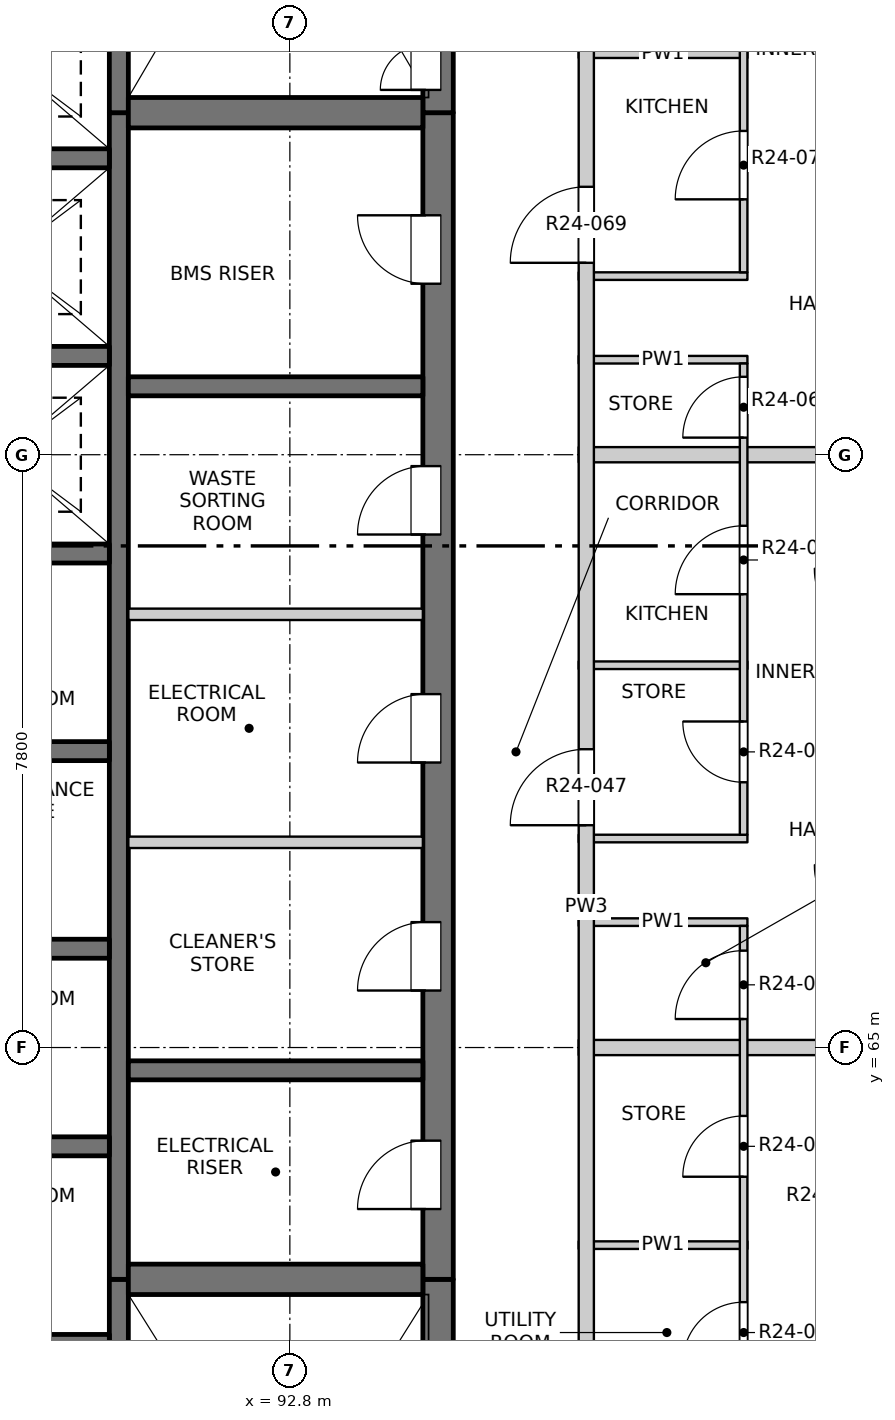
"""IFC4 building model, lengths in metres.
Left out: names, types, materials, properties, quantities, classifications, styles, units other than length and angle.
Written with IfcOpenShell. Run it as: python <this file> out.ifc"""

import sys

from ifc_helpers import new_model, si_unit, direction, frame, frame_2d, origin, place, context, subcontext, project, spatial, rectangle, extrude, element, fill, save


model = new_model("IFC4")
c1 = context("Model", 3, precision=1e-05, world=origin(), true_north=direction((0.0, 1.0)))
c2 = subcontext(c1, "Body", "Model", "MODEL_VIEW")
j1 = project(units=[si_unit("LENGTHUNIT", "METRE"), si_unit("PLANEANGLEUNIT", "RADIAN")], contexts=[c1])
p1 = place(None, origin())
s1 = spatial("IfcSite", under=j1, at=p1, CompositionType="ELEMENT")
p2 = place(p1, origin())
s2 = spatial("IfcBuilding", under=s1, at=p2, CompositionType="ELEMENT")
p3 = place(p2, frame((0.0, 0.0, 246.0)))
s3 = spatial("IfcBuildingStorey", under=s2, at=p3, CompositionType="ELEMENT", Elevation=246.0)
p4 = place(p3, frame((94.75, 55.05, -0.3), z_axis=(0.0, 0.0, 1.0), x_axis=(0.0, 1.0, 0.0)))
e1 = element("IfcWall", 1, at=p4, inside=s3, PredefinedType="SOLIDWALL", context=c2, shape_type="SweptSolid", body=[
    extrude(rectangle(XDim=6.9, YDim=0.4, at=frame_2d((3.45, 0.0))), origin(), (0.0, 0.0, 1.0), 3.45),
])
p5 = place(p4, frame((0.6, 0.0, 0.3)))
e2 = element("IfcOpeningElement", 2, at=p5, cuts=e1, PredefinedType="OPENING", context=c2, shape_type="SweptSolid", body=[
    extrude(rectangle(XDim=1.2, YDim=2.1, at=frame_2d((0.6, 1.05))), frame((0.0, 0.21, 0.0), z_axis=(0.0, -1.0, 0.0), x_axis=(1.0, 0.0, 0.0)), (0.0, 0.0, 1.0), 0.42),
])
p6 = place(p3, frame((94.75, 61.95, -0.3), z_axis=(0.0, 0.0, 1.0), x_axis=(0.0, 1.0, 0.0)))
e3 = element("IfcWall", 3, at=p6, inside=s3, PredefinedType="SOLIDWALL", context=c2, shape_type="SweptSolid", body=[
    extrude(rectangle(XDim=15.35, YDim=0.4, at=frame_2d((7.675, 0.0))), origin(), (0.0, 0.0, 1.0), 3.45),
])
p7 = place(p6, frame((0.925, 0.0, 0.3)))
e4 = element("IfcOpeningElement", 4, at=p7, cuts=e3, PredefinedType="OPENING", context=c2, shape_type="SweptSolid", body=[
    extrude(rectangle(XDim=0.9, YDim=2.1, at=frame_2d((0.45, 1.05))), frame((0.0, 0.21, 0.0), z_axis=(0.0, -1.0, 0.0), x_axis=(1.0, 0.0, 0.0)), (0.0, 0.0, 1.0), 0.42),
])
p8 = place(p6, frame((3.8, 0.0, 0.3)))
e5 = element("IfcOpeningElement", 5, at=p8, cuts=e3, PredefinedType="OPENING", context=c2, shape_type="SweptSolid", body=[
    extrude(rectangle(XDim=0.9, YDim=2.1, at=frame_2d((0.45, 1.05))), frame((0.0, 0.21, 0.0), z_axis=(0.0, -1.0, 0.0), x_axis=(1.0, 0.0, 0.0)), (0.0, 0.0, 1.0), 0.42),
])
p9 = place(p6, frame((6.8, 0.0, 0.3)))
e6 = element("IfcOpeningElement", 6, at=p9, cuts=e3, PredefinedType="OPENING", context=c2, shape_type="SweptSolid", body=[
    extrude(rectangle(XDim=0.9, YDim=2.1, at=frame_2d((0.45, 1.05))), frame((0.0, 0.21, 0.0), z_axis=(0.0, -1.0, 0.0), x_axis=(1.0, 0.0, 0.0)), (0.0, 0.0, 1.0), 0.42),
])
p10 = place(p6, frame((9.8, 0.0, 0.3)))
e7 = element("IfcOpeningElement", 7, at=p10, cuts=e3, PredefinedType="OPENING", context=c2, shape_type="SweptSolid", body=[
    extrude(rectangle(XDim=0.9, YDim=2.1, at=frame_2d((0.45, 1.05))), frame((0.0, 0.21, 0.0), z_axis=(0.0, -1.0, 0.0), x_axis=(1.0, 0.0, 0.0)), (0.0, 0.0, 1.0), 0.42),
])
p11 = place(p6, frame((13.1, 0.0, 0.3)))
e8 = element("IfcOpeningElement", 8, at=p11, cuts=e3, PredefinedType="OPENING", context=c2, shape_type="SweptSolid", body=[
    extrude(rectangle(XDim=0.9, YDim=2.1, at=frame_2d((0.45, 1.05))), frame((0.0, 0.21, 0.0), z_axis=(0.0, -1.0, 0.0), x_axis=(1.0, 0.0, 0.0)), (0.0, 0.0, 1.0), 0.42),
])
p12 = place(p3, frame((94.75, 77.3, -0.3), z_axis=(0.0, 0.0, 1.0), x_axis=(0.0, 1.0, 0.0)))
e9 = element("IfcWall", 9, at=p12, inside=s3, PredefinedType="SOLIDWALL", context=c2, shape_type="SweptSolid", body=[
    extrude(rectangle(XDim=7.4, YDim=0.4, at=frame_2d((3.7, 0.0))), origin(), (0.0, 0.0, 1.0), 3.45),
])
p13 = place(p12, frame((0.3, 0.0, 0.3)))
e10 = element("IfcOpeningElement", 10, at=p13, cuts=e9, PredefinedType="OPENING", context=c2, shape_type="SweptSolid", body=[
    extrude(rectangle(XDim=1.2, YDim=2.1, at=frame_2d((0.6, 1.05))), frame((0.0, 0.21, 0.0), z_axis=(0.0, -1.0, 0.0), x_axis=(1.0, 0.0, 0.0)), (0.0, 0.0, 1.0), 0.42),
])
p14 = place(p3, frame((90.55, 55.45, -0.3), z_axis=(0.0, 0.0, 1.0), x_axis=(0.0, 1.0, 0.0)))
e11 = element("IfcWall", 11, at=p14, inside=s3, PredefinedType="SOLIDWALL", context=c2, shape_type="SweptSolid", body=[
    extrude(rectangle(XDim=6.5, YDim=0.25, at=frame_2d((3.25, 0.0))), origin(), (0.0, 0.0, 1.0), 3.45),
])
p15 = place(p3, frame((90.55, 61.95, -0.3), z_axis=(0.0, 0.0, 1.0), x_axis=(0.0, 1.0, 0.0)))
e12 = element("IfcWall", 12, at=p15, inside=s3, PredefinedType="SOLIDWALL", context=c2, shape_type="SweptSolid", body=[
    extrude(rectangle(XDim=15.35, YDim=0.25, at=frame_2d((7.675, 0.0))), origin(), (0.0, 0.0, 1.0), 3.45),
])
p16 = place(p3, frame((90.55, 77.3, -0.3), z_axis=(0.0, 0.0, 1.0), x_axis=(0.0, 1.0, 0.0)))
e13 = element("IfcWall", 13, at=p16, inside=s3, PredefinedType="SOLIDWALL", context=c2, shape_type="SweptSolid", body=[
    extrude(rectangle(XDim=7.0, YDim=0.25, at=frame_2d((3.5, 0.0))), origin(), (0.0, 0.0, 1.0), 3.45),
])
for number, where, z_axis, x_axis in (
    (14, (87.425, 61.1, -0.3), (0.0, 0.0, 1.0), (1.0, 0.0, 0.0)),
    (15, (87.425, 63.7, -0.3), (0.0, 0.0, 1.0), (1.0, 0.0, 0.0)),
    (16, (87.425, 66.3, -0.3), (0.0, 0.0, 1.0), (1.0, 0.0, 0.0)),
    (17, (87.425, 68.9, -0.3), (0.0, 0.0, 1.0), (1.0, 0.0, 0.0)),
    (18, (87.425, 71.5, -0.3), (0.0, 0.0, 1.0), (1.0, 0.0, 0.0)),
    (19, (87.425, 74.1, -0.3), (0.0, 0.0, 1.0), (1.0, 0.0, 0.0)),
    (20, (87.425, 76.7, -0.3), (0.0, 0.0, 1.0), (1.0, 0.0, 0.0)),
):
    element("IfcWall", number, at=place(p3, frame(where, z_axis=z_axis, x_axis=x_axis)), inside=s3, PredefinedType="SOLIDWALL", context=c2, shape_type="SweptSolid", body=[
        extrude(rectangle(XDim=3.0, YDim=0.25, at=frame_2d((1.5, 0.0))), origin(), (0.0, 0.0, 1.0), 3.45),
    ])
p17 = place(p3, frame((90.675, 61.95, -0.3), z_axis=(0.0, 0.0, 1.0), x_axis=(1.0, 0.0, 0.0)))
e21 = element("IfcWall", 21, at=p17, inside=s3, PredefinedType="SOLIDWALL", context=c2, shape_type="SweptSolid", body=[
    extrude(rectangle(XDim=3.875, YDim=0.4, at=frame_2d((1.938, 0.0))), origin(), (0.0, 0.0, 1.0), 3.45),
])
for number, where, z_axis, x_axis in (
    (22, (90.675, 64.7, -0.3), (0.0, 0.0, 1.0), (1.0, 0.0, 0.0)),
    (23, (90.675, 73.7, -0.3), (0.0, 0.0, 1.0), (1.0, 0.0, 0.0)),
):
    element("IfcWall", number, at=place(p3, frame(where, z_axis=z_axis, x_axis=x_axis)), inside=s3, PredefinedType="SOLIDWALL", context=c2, shape_type="SweptSolid", body=[
        extrude(rectangle(XDim=3.875, YDim=0.25, at=frame_2d((1.938, 0.0))), origin(), (0.0, 0.0, 1.0), 3.45),
    ])
p18 = place(p3, frame((90.675, 77.3, -0.3), z_axis=(0.0, 0.0, 1.0), x_axis=(1.0, 0.0, 0.0)))
e24 = element("IfcWall", 24, at=p18, inside=s3, PredefinedType="SOLIDWALL", context=c2, shape_type="SweptSolid", body=[
    extrude(rectangle(XDim=3.875, YDim=0.4, at=frame_2d((1.938, 0.0))), origin(), (0.0, 0.0, 1.0), 3.45),
])
p19 = place(p3, frame((96.6, 62.4, 0.0), z_axis=(0.0, 0.0, 1.0), x_axis=(1.0, 0.0, 0.0)))
e25 = element("IfcWall", 25, at=p19, inside=s3, PredefinedType="PARTITIONING", context=c2, shape_type="SweptSolid", body=[
    extrude(rectangle(XDim=2.22, YDim=0.1, at=frame_2d((1.11, 0.0))), origin(), (0.0, 0.0, 1.0), 3.15),
])
p20 = place(p3, frame((96.6, 65.0, 0.0), z_axis=(0.0, 0.0, 1.0), x_axis=(1.0, 0.0, 0.0)))
e26 = element("IfcWall", 26, at=p20, inside=s3, PredefinedType="PARTITIONING", context=c2, shape_type="SweptSolid", body=[
    extrude(rectangle(XDim=7.6, YDim=0.2, at=frame_2d((3.8, 0.0))), origin(), (0.0, 0.0, 1.0), 3.15),
])
p21 = place(p3, frame((96.6, 66.65, 0.0), z_axis=(0.0, 0.0, 1.0), x_axis=(1.0, 0.0, 0.0)))
e27 = element("IfcWall", 27, at=p21, inside=s3, PredefinedType="PARTITIONING", context=c2, shape_type="SweptSolid", body=[
    extrude(rectangle(XDim=2.22, YDim=0.1, at=frame_2d((1.11, 0.0))), origin(), (0.0, 0.0, 1.0), 3.15),
])
p22 = place(p3, frame((90.675, 67.7, 0.0), z_axis=(0.0, 0.0, 1.0), x_axis=(1.0, 0.0, 0.0)))
e28 = element("IfcWall", 28, at=p22, inside=s3, PredefinedType="PARTITIONING", context=c2, shape_type="SweptSolid", body=[
    extrude(rectangle(XDim=3.875, YDim=0.15, at=frame_2d((1.938, 0.0))), origin(), (0.0, 0.0, 1.0), 3.15),
])
for number, where, z_axis, x_axis in (
    (29, (96.6, 67.75, 0.0), (0.0, 0.0, 1.0), (1.0, 0.0, 0.0)),
    (30, (96.6, 70.03, 0.0), (0.0, 0.0, 1.0), (1.0, 0.0, 0.0)),
):
    element("IfcWall", number, at=place(p3, frame(where, z_axis=z_axis, x_axis=x_axis)), inside=s3, PredefinedType="PARTITIONING", context=c2, shape_type="SweptSolid", body=[
        extrude(rectangle(XDim=2.22, YDim=0.1, at=frame_2d((1.11, 0.0))), origin(), (0.0, 0.0, 1.0), 3.15),
    ])
p23 = place(p3, frame((90.675, 70.7, 0.0), z_axis=(0.0, 0.0, 1.0), x_axis=(1.0, 0.0, 0.0)))
e31 = element("IfcWall", 31, at=p23, inside=s3, PredefinedType="PARTITIONING", context=c2, shape_type="SweptSolid", body=[
    extrude(rectangle(XDim=3.875, YDim=0.15, at=frame_2d((1.938, 0.0))), origin(), (0.0, 0.0, 1.0), 3.15),
])
p24 = place(p3, frame((96.6, 72.8, 0.0), z_axis=(0.0, 0.0, 1.0), x_axis=(1.0, 0.0, 0.0)))
e32 = element("IfcWall", 32, at=p24, inside=s3, PredefinedType="PARTITIONING", context=c2, shape_type="SweptSolid", body=[
    extrude(rectangle(XDim=7.6, YDim=0.2, at=frame_2d((3.8, 0.0))), origin(), (0.0, 0.0, 1.0), 3.15),
])
for number, where, z_axis, x_axis in (
    (33, (96.6, 74.05, 0.0), (0.0, 0.0, 1.0), (1.0, 0.0, 0.0)),
    (34, (96.6, 75.15, 0.0), (0.0, 0.0, 1.0), (1.0, 0.0, 0.0)),
    (35, (96.6, 78.07, 0.0), (0.0, 0.0, 1.0), (1.0, 0.0, 0.0)),
):
    element("IfcWall", number, at=place(p3, frame(where, z_axis=z_axis, x_axis=x_axis)), inside=s3, PredefinedType="PARTITIONING", context=c2, shape_type="SweptSolid", body=[
        extrude(rectangle(XDim=2.22, YDim=0.1, at=frame_2d((1.11, 0.0))), origin(), (0.0, 0.0, 1.0), 3.15),
    ])
p25 = place(p3, frame((96.7, 49.5, 0.0), z_axis=(0.0, 0.0, 1.0), x_axis=(0.0, 1.0, 0.0)))
e36 = element("IfcWall", 36, at=p25, inside=s3, PredefinedType="PARTITIONING", context=c2, shape_type="SweptSolid", body=[
    extrude(rectangle(XDim=34.7, YDim=0.2, at=frame_2d((17.35, 0.0))), origin(), (0.0, 0.0, 1.0), 3.15),
])
p26 = place(p25, frame((3.075, 0.0, 0.0)))
e37 = element("IfcOpeningElement", 37, at=p26, cuts=e36, PredefinedType="OPENING", context=c2, shape_type="SweptSolid", body=[
    extrude(rectangle(XDim=1.0, YDim=2.1, at=frame_2d((0.5, 1.05))), frame((0.0, 0.11, 0.0), z_axis=(0.0, -1.0, 0.0), x_axis=(1.0, 0.0, 0.0)), (0.0, 0.0, 1.0), 0.22),
])
p27 = place(p25, frame((18.425, 0.0, 0.0)))
e38 = element("IfcOpeningElement", 38, at=p27, cuts=e36, PredefinedType="OPENING", context=c2, shape_type="SweptSolid", body=[
    extrude(rectangle(XDim=1.0, YDim=2.1, at=frame_2d((0.5, 1.05))), frame((0.0, 0.11, 0.0), z_axis=(0.0, -1.0, 0.0), x_axis=(1.0, 0.0, 0.0)), (0.0, 0.0, 1.0), 0.22),
])
p28 = place(p25, frame((25.825, 0.0, 0.0)))
e39 = element("IfcOpeningElement", 39, at=p28, cuts=e36, PredefinedType="OPENING", context=c2, shape_type="SweptSolid", body=[
    extrude(rectangle(XDim=1.0, YDim=2.1, at=frame_2d((0.5, 1.05))), frame((0.0, 0.11, 0.0), z_axis=(0.0, -1.0, 0.0), x_axis=(1.0, 0.0, 0.0)), (0.0, 0.0, 1.0), 0.22),
])
p29 = place(p3, frame((98.77, 54.9, 0.0), z_axis=(0.0, 0.0, 1.0), x_axis=(0.0, 1.0, 0.0)))
e40 = element("IfcWall", 40, at=p29, inside=s3, PredefinedType="PARTITIONING", context=c2, shape_type="SweptSolid", body=[
    extrude(rectangle(XDim=11.7, YDim=0.1, at=frame_2d((5.85, 0.0))), origin(), (0.0, 0.0, 1.0), 3.15),
])
p30 = place(p29, frame((1.225, 0.0, 0.0)))
e41 = element("IfcOpeningElement", 41, at=p30, cuts=e40, PredefinedType="OPENING", context=c2, shape_type="SweptSolid", body=[
    extrude(rectangle(XDim=0.9, YDim=2.1, at=frame_2d((0.45, 1.05))), frame((0.0, 0.06, 0.0), z_axis=(0.0, -1.0, 0.0), x_axis=(1.0, 0.0, 0.0)), (0.0, 0.0, 1.0), 0.12),
])
p31 = place(p29, frame((3.85, 0.0, 0.0)))
e42 = element("IfcOpeningElement", 42, at=p31, cuts=e40, PredefinedType="OPENING", context=c2, shape_type="SweptSolid", body=[
    extrude(rectangle(XDim=0.9, YDim=2.1, at=frame_2d((0.45, 1.05))), frame((0.0, 0.06, 0.0), z_axis=(0.0, -1.0, 0.0), x_axis=(1.0, 0.0, 0.0)), (0.0, 0.0, 1.0), 0.12),
])
p32 = place(p29, frame((5.95, 0.0, 0.0)))
e43 = element("IfcOpeningElement", 43, at=p32, cuts=e40, PredefinedType="OPENING", context=c2, shape_type="SweptSolid", body=[
    extrude(rectangle(XDim=0.8, YDim=2.1, at=frame_2d((0.4, 1.05))), frame((0.0, 0.06, 0.0), z_axis=(0.0, -1.0, 0.0), x_axis=(1.0, 0.0, 0.0)), (0.0, 0.0, 1.0), 0.12),
])
p33 = place(p29, frame((8.4, 0.0, 0.0)))
e44 = element("IfcOpeningElement", 44, at=p33, cuts=e40, PredefinedType="OPENING", context=c2, shape_type="SweptSolid", body=[
    extrude(rectangle(XDim=0.8, YDim=2.1, at=frame_2d((0.4, 1.05))), frame((0.0, 0.06, 0.0), z_axis=(0.0, -1.0, 0.0), x_axis=(1.0, 0.0, 0.0)), (0.0, 0.0, 1.0), 0.12),
])
p34 = place(p29, frame((10.475, 0.0, 0.0)))
e45 = element("IfcOpeningElement", 45, at=p34, cuts=e40, PredefinedType="OPENING", context=c2, shape_type="SweptSolid", body=[
    extrude(rectangle(XDim=0.9, YDim=2.1, at=frame_2d((0.45, 1.05))), frame((0.0, 0.06, 0.0), z_axis=(0.0, -1.0, 0.0), x_axis=(1.0, 0.0, 0.0)), (0.0, 0.0, 1.0), 0.12),
])
p35 = place(p3, frame((98.77, 67.8, 0.0), z_axis=(0.0, 0.0, 1.0), x_axis=(0.0, 1.0, 0.0)))
e46 = element("IfcWall", 46, at=p35, inside=s3, PredefinedType="PARTITIONING", context=c2, shape_type="SweptSolid", body=[
    extrude(rectangle(XDim=6.2, YDim=0.1, at=frame_2d((3.1, 0.0))), origin(), (0.0, 0.0, 1.0), 3.15),
])
p36 = place(p35, frame((0.69, 0.0, 0.0)))
e47 = element("IfcOpeningElement", 47, at=p36, cuts=e46, PredefinedType="OPENING", context=c2, shape_type="SweptSolid", body=[
    extrude(rectangle(XDim=0.8, YDim=2.1, at=frame_2d((0.4, 1.05))), frame((0.0, 0.06, 0.0), z_axis=(0.0, -1.0, 0.0), x_axis=(1.0, 0.0, 0.0)), (0.0, 0.0, 1.0), 0.12),
])
p37 = place(p35, frame((3.165, 0.0, 0.0)))
e48 = element("IfcOpeningElement", 48, at=p37, cuts=e46, PredefinedType="OPENING", context=c2, shape_type="SweptSolid", body=[
    extrude(rectangle(XDim=0.9, YDim=2.1, at=frame_2d((0.45, 1.05))), frame((0.0, 0.06, 0.0), z_axis=(0.0, -1.0, 0.0), x_axis=(1.0, 0.0, 0.0)), (0.0, 0.0, 1.0), 0.12),
])
p38 = place(p35, frame((5.225, 0.0, 0.0)))
e49 = element("IfcOpeningElement", 49, at=p38, cuts=e46, PredefinedType="OPENING", context=c2, shape_type="SweptSolid", body=[
    extrude(rectangle(XDim=0.8, YDim=2.1, at=frame_2d((0.4, 1.05))), frame((0.0, 0.06, 0.0), z_axis=(0.0, -1.0, 0.0), x_axis=(1.0, 0.0, 0.0)), (0.0, 0.0, 1.0), 0.12),
])
p39 = place(p3, frame((98.77, 75.2, 0.0), z_axis=(0.0, 0.0, 1.0), x_axis=(0.0, 1.0, 0.0)))
e50 = element("IfcWall", 50, at=p39, inside=s3, PredefinedType="PARTITIONING", context=c2, shape_type="SweptSolid", body=[
    extrude(rectangle(XDim=5.35, YDim=0.1, at=frame_2d((2.675, 0.0))), origin(), (0.0, 0.0, 1.0), 3.15),
])
p40 = place(p39, frame((0.96, 0.0, 0.0)))
e51 = element("IfcOpeningElement", 51, at=p40, cuts=e50, PredefinedType="OPENING", context=c2, shape_type="SweptSolid", body=[
    extrude(rectangle(XDim=0.9, YDim=2.1, at=frame_2d((0.45, 1.05))), frame((0.0, 0.06, 0.0), z_axis=(0.0, -1.0, 0.0), x_axis=(1.0, 0.0, 0.0)), (0.0, 0.0, 1.0), 0.12),
])
p41 = place(p39, frame((3.685, 0.0, 0.0)))
e52 = element("IfcOpeningElement", 52, at=p41, cuts=e50, PredefinedType="OPENING", context=c2, shape_type="SweptSolid", body=[
    extrude(rectangle(XDim=0.9, YDim=2.1, at=frame_2d((0.45, 1.05))), frame((0.0, 0.06, 0.0), z_axis=(0.0, -1.0, 0.0), x_axis=(1.0, 0.0, 0.0)), (0.0, 0.0, 1.0), 0.12),
])
p42 = place(p32, origin())
e53 = element("IfcDoor", 53, at=p42, inside=s3, OperationType="SINGLE_SWING_LEFT", PredefinedType="DOOR", context=c2, shape_type="SweptSolid", body=[
    extrude(rectangle(XDim=0.8, YDim=2.1, at=frame_2d((0.4, 1.05))), frame((0.0, 0.025, 0.0), z_axis=(0.0, -1.0, 0.0), x_axis=(1.0, 0.0, 0.0)), (0.0, 0.0, 1.0), 0.05),
])
fill(e43, e53)
p43 = place(p7, origin())
e54 = element("IfcDoor", 54, at=p43, inside=s3, OperationType="SINGLE_SWING_LEFT", PredefinedType="DOOR", context=c2, shape_type="SweptSolid", body=[
    extrude(rectangle(XDim=0.9, YDim=2.1, at=frame_2d((0.45, 1.05))), frame((0.0, 0.185, 0.0), z_axis=(0.0, -1.0, 0.0), x_axis=(1.0, 0.0, 0.0)), (0.0, 0.0, 1.0), 0.05),
])
fill(e4, e54)
p44 = place(p33, origin())
e55 = element("IfcDoor", 55, at=p44, inside=s3, OperationType="SINGLE_SWING_LEFT", PredefinedType="DOOR", context=c2, shape_type="SweptSolid", body=[
    extrude(rectangle(XDim=0.8, YDim=2.1, at=frame_2d((0.4, 1.05))), frame((0.0, 0.025, 0.0), z_axis=(0.0, -1.0, 0.0), x_axis=(1.0, 0.0, 0.0)), (0.0, 0.0, 1.0), 0.05),
])
fill(e44, e55)
p45 = place(p34, origin())
e56 = element("IfcDoor", 56, at=p45, inside=s3, OperationType="SINGLE_SWING_LEFT", PredefinedType="DOOR", context=c2, shape_type="SweptSolid", body=[
    extrude(rectangle(XDim=0.9, YDim=2.1, at=frame_2d((0.45, 1.05))), frame((0.0, 0.025, 0.0), z_axis=(0.0, -1.0, 0.0), x_axis=(1.0, 0.0, 0.0)), (0.0, 0.0, 1.0), 0.05),
])
fill(e45, e56)
p46 = place(p8, origin())
e57 = element("IfcDoor", 57, at=p46, inside=s3, OperationType="SINGLE_SWING_LEFT", PredefinedType="DOOR", context=c2, shape_type="SweptSolid", body=[
    extrude(rectangle(XDim=0.9, YDim=2.1, at=frame_2d((0.45, 1.05))), frame((0.0, 0.185, 0.0), z_axis=(0.0, -1.0, 0.0), x_axis=(1.0, 0.0, 0.0)), (0.0, 0.0, 1.0), 0.05),
])
fill(e5, e57)
p47 = place(p27, origin())
e58 = element("IfcDoor", 58, at=p47, inside=s3, OperationType="SINGLE_SWING_LEFT", PredefinedType="DOOR", context=c2, shape_type="SweptSolid", body=[
    extrude(rectangle(XDim=1.0, YDim=2.1, at=frame_2d((0.5, 1.05))), frame((0.0, 0.025, 0.0), z_axis=(0.0, -1.0, 0.0), x_axis=(1.0, 0.0, 0.0)), (0.0, 0.0, 1.0), 0.05),
])
fill(e38, e58)
p48 = place(p36, origin())
e59 = element("IfcDoor", 59, at=p48, inside=s3, OperationType="SINGLE_SWING_RIGHT", PredefinedType="DOOR", context=c2, shape_type="SweptSolid", body=[
    extrude(rectangle(XDim=0.8, YDim=2.1, at=frame_2d((0.4, 1.05))), frame((0.0, 0.025, 0.0), z_axis=(0.0, -1.0, 0.0), x_axis=(1.0, 0.0, 0.0)), (0.0, 0.0, 1.0), 0.05),
])
fill(e47, e59)
p49 = place(p9, origin())
e60 = element("IfcDoor", 60, at=p49, inside=s3, OperationType="SINGLE_SWING_LEFT", PredefinedType="DOOR", context=c2, shape_type="SweptSolid", body=[
    extrude(rectangle(XDim=0.9, YDim=2.1, at=frame_2d((0.45, 1.05))), frame((0.0, 0.185, 0.0), z_axis=(0.0, -1.0, 0.0), x_axis=(1.0, 0.0, 0.0)), (0.0, 0.0, 1.0), 0.05),
])
fill(e6, e60)
p50 = place(p37, origin())
e61 = element("IfcDoor", 61, at=p50, inside=s3, OperationType="SINGLE_SWING_LEFT", PredefinedType="DOOR", context=c2, shape_type="SweptSolid", body=[
    extrude(rectangle(XDim=0.9, YDim=2.1, at=frame_2d((0.45, 1.05))), frame((0.0, 0.025, 0.0), z_axis=(0.0, -1.0, 0.0), x_axis=(1.0, 0.0, 0.0)), (0.0, 0.0, 1.0), 0.05),
])
fill(e48, e61)
p51 = place(p10, origin())
e62 = element("IfcDoor", 62, at=p51, inside=s3, OperationType="SINGLE_SWING_LEFT", PredefinedType="DOOR", context=c2, shape_type="SweptSolid", body=[
    extrude(rectangle(XDim=0.9, YDim=2.1, at=frame_2d((0.45, 1.05))), frame((0.0, 0.185, 0.0), z_axis=(0.0, -1.0, 0.0), x_axis=(1.0, 0.0, 0.0)), (0.0, 0.0, 1.0), 0.05),
])
fill(e7, e62)
p52 = place(p38, origin())
e63 = element("IfcDoor", 63, at=p52, inside=s3, OperationType="SINGLE_SWING_LEFT", PredefinedType="DOOR", context=c2, shape_type="SweptSolid", body=[
    extrude(rectangle(XDim=0.8, YDim=2.1, at=frame_2d((0.4, 1.05))), frame((0.0, 0.025, 0.0), z_axis=(0.0, -1.0, 0.0), x_axis=(1.0, 0.0, 0.0)), (0.0, 0.0, 1.0), 0.05),
])
fill(e49, e63)
p53 = place(p11, origin())
e64 = element("IfcDoor", 64, at=p53, inside=s3, OperationType="SINGLE_SWING_RIGHT", PredefinedType="DOOR", context=c2, shape_type="SweptSolid", body=[
    extrude(rectangle(XDim=0.9, YDim=2.1, at=frame_2d((0.45, 1.05))), frame((0.0, 0.185, 0.0), z_axis=(0.0, -1.0, 0.0), x_axis=(1.0, 0.0, 0.0)), (0.0, 0.0, 1.0), 0.05),
])
fill(e8, e64)
p54 = place(p28, origin())
e65 = element("IfcDoor", 65, at=p54, inside=s3, OperationType="SINGLE_SWING_LEFT", PredefinedType="DOOR", context=c2, shape_type="SweptSolid", body=[
    extrude(rectangle(XDim=1.0, YDim=2.1, at=frame_2d((0.5, 1.05))), frame((0.0, 0.025, 0.0), z_axis=(0.0, -1.0, 0.0), x_axis=(1.0, 0.0, 0.0)), (0.0, 0.0, 1.0), 0.05),
])
fill(e39, e65)
p55 = place(p40, origin())
e66 = element("IfcDoor", 66, at=p55, inside=s3, OperationType="SINGLE_SWING_LEFT", PredefinedType="DOOR", context=c2, shape_type="SweptSolid", body=[
    extrude(rectangle(XDim=0.9, YDim=2.1, at=frame_2d((0.45, 1.05))), frame((0.0, 0.025, 0.0), z_axis=(0.0, -1.0, 0.0), x_axis=(1.0, 0.0, 0.0)), (0.0, 0.0, 1.0), 0.05),
])
fill(e51, e66)
p56 = place(p13, origin())
e67 = element("IfcDoor", 67, at=p56, inside=s3, OperationType="DOUBLE_DOOR_SINGLE_SWING", PredefinedType="DOOR", context=c2, shape_type="SweptSolid", body=[
    extrude(rectangle(XDim=1.2, YDim=2.1, at=frame_2d((0.6, 1.05))), frame((0.0, 0.185, 0.0), z_axis=(0.0, -1.0, 0.0), x_axis=(1.0, 0.0, 0.0)), (0.0, 0.0, 1.0), 0.05),
])
fill(e10, e67)
save(model, sys.argv[1])
